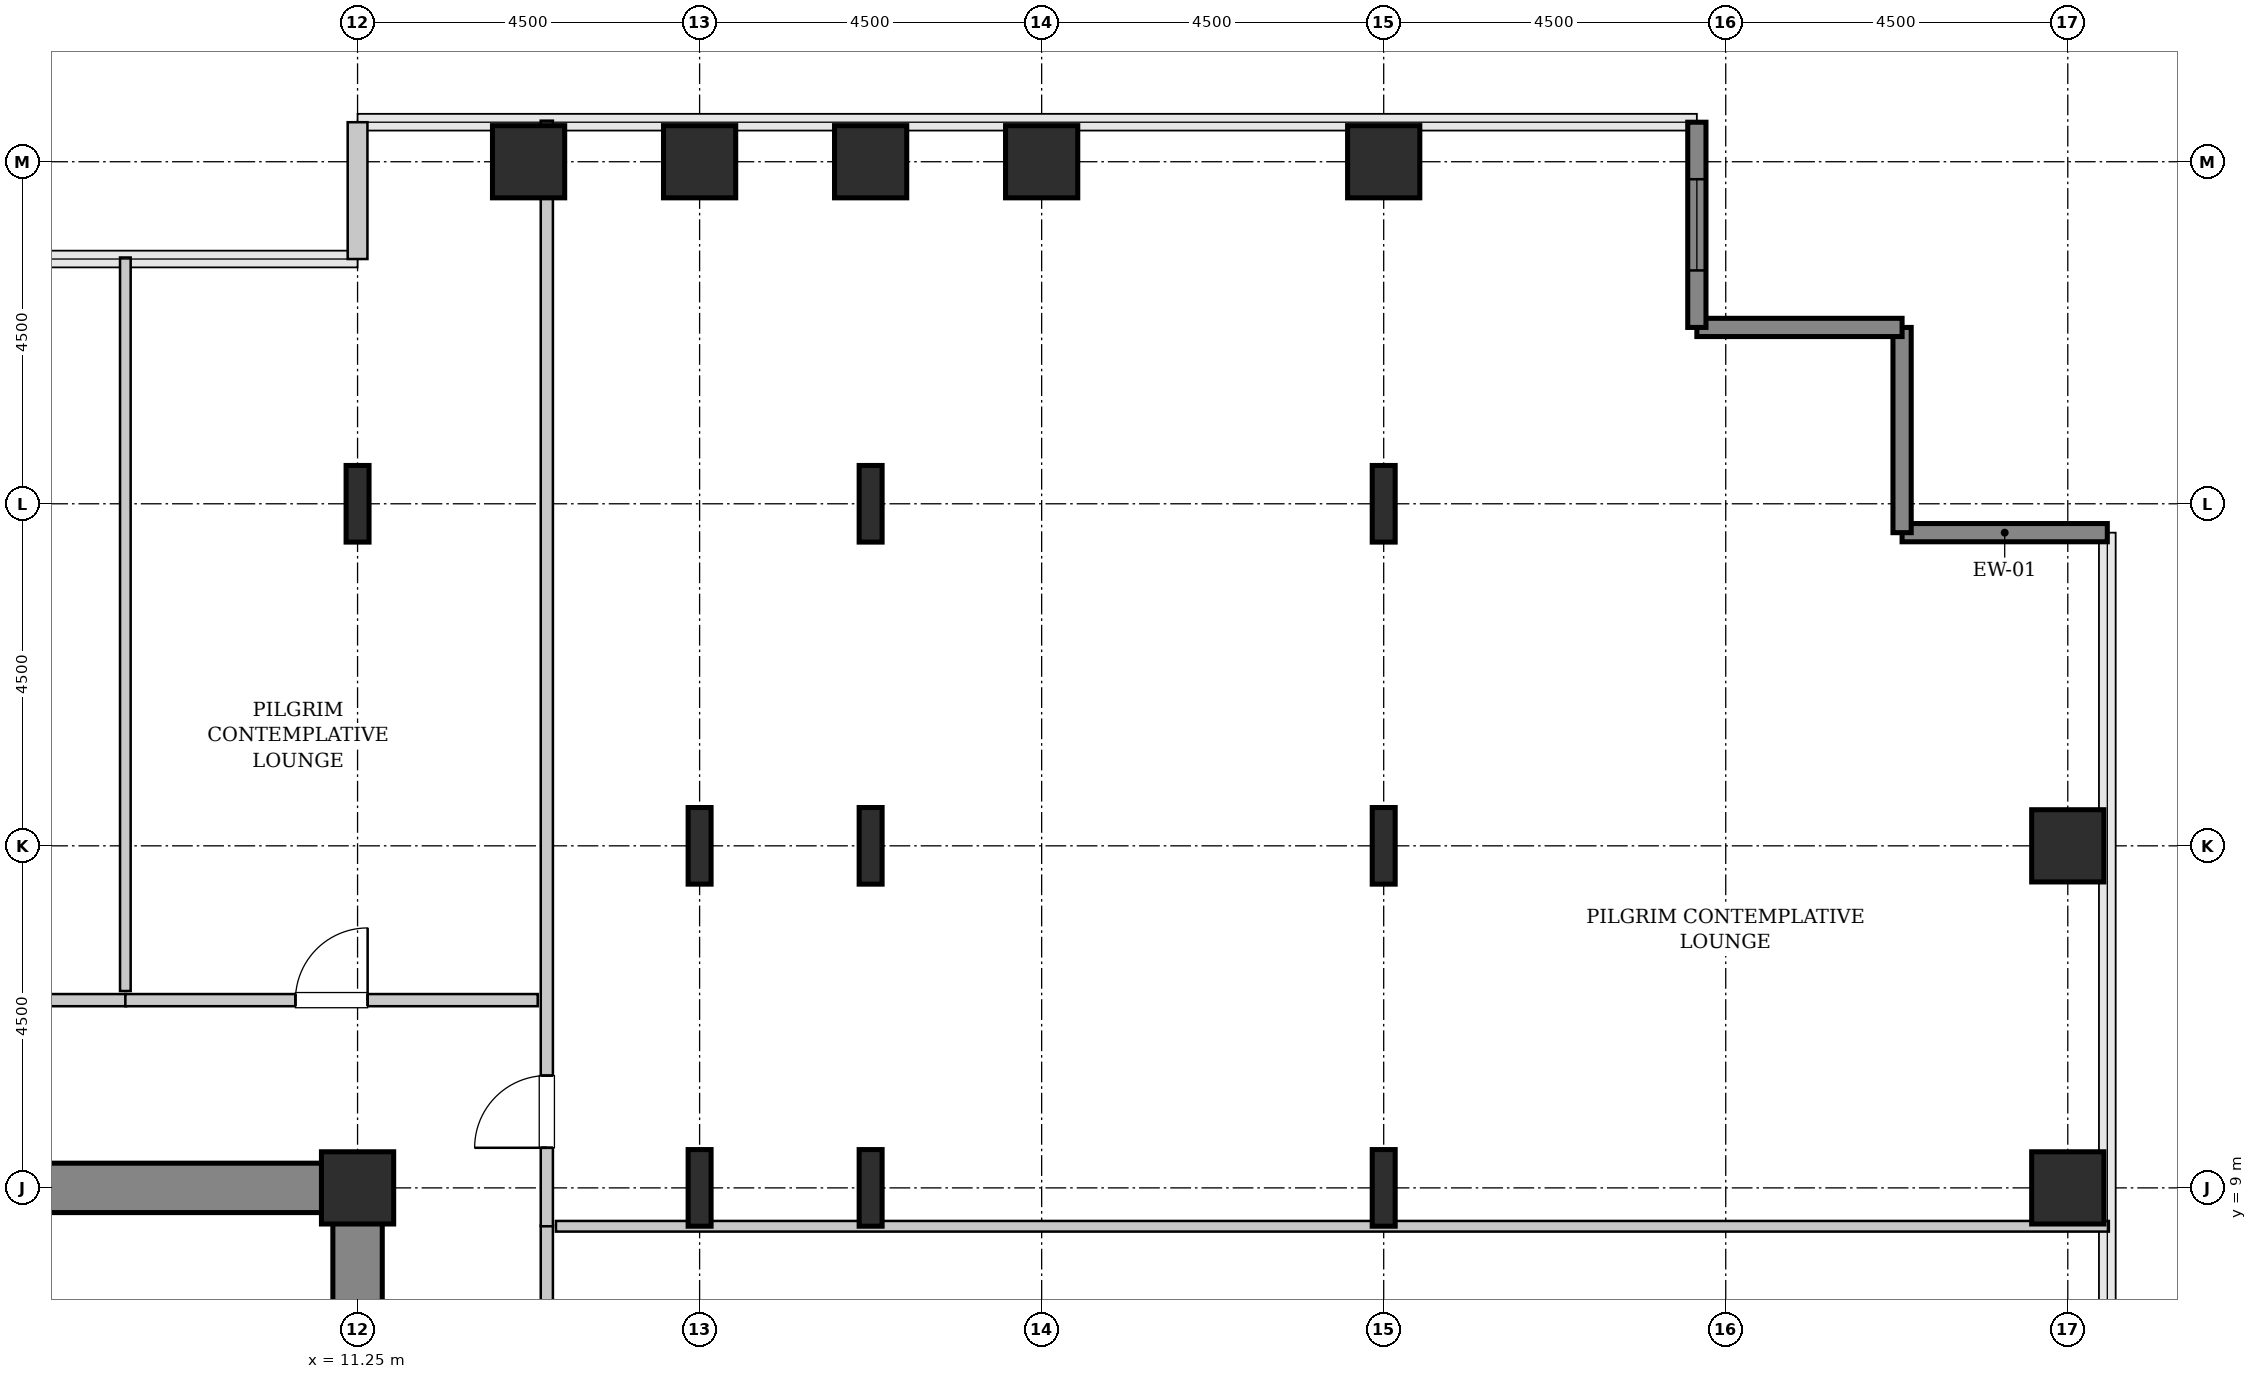
"""IFC4 building model, lengths in metres.
Left out: names, types, materials, properties, quantities, classifications, styles, units other than length and angle.
Written with IfcOpenShell. Run it as: python <this file> out.ifc"""

import sys

from ifc_helpers import new_model, si_unit, direction, frame, frame_2d, origin, origin_2d, place, context, subcontext, project, spatial, rectangle, hollow_rectangle, i_section, extrude, source, transform, mapped, element, fill, save


model = new_model("IFC4")
c1 = context("Model", 3, precision=1e-05, world=origin(), true_north=direction((0.0, 1.0)))
c2 = subcontext(c1, "Body", "Model", "MODEL_VIEW")
j1 = project(units=[si_unit("LENGTHUNIT", "METRE"), si_unit("PLANEANGLEUNIT", "RADIAN")], contexts=[c1])
p1 = place(None, origin())
s1 = spatial("IfcSite", under=j1, at=p1, CompositionType="ELEMENT")
p2 = place(p1, origin())
s2 = spatial("IfcBuilding", under=s1, at=p2, CompositionType="ELEMENT")
p3 = place(p2, frame((0.0, 0.0, 36.8)))
s3 = spatial("IfcBuildingStorey", under=s2, at=p3, CompositionType="ELEMENT", Elevation=36.8)
m1 = source(origin(), c2, "Body", "SweptSolid", [
    extrude(rectangle(XDim=10.025, YDim=0.65, at=frame_2d((5.012, 0.0))), origin(), (0.0, 0.0, 1.0), 3.8),
])
p4 = place(p3, frame((1.55, 9.0, 0.0), z_axis=(0.0, 0.0, 1.0), x_axis=(1.0, 0.0, 0.0)))
e1 = element("IfcWall", 1, at=p4, inside=s3, PredefinedType="SHEAR", context=c2, shape_type="MappedRepresentation", body=[
    mapped(m1, transform((0.0, 0.0, 0.0), x_axis=(1.0, 0.0, 0.0), y_axis=(0.0, 1.0, 0.0), z_axis=(0.0, 0.0, 1.0), scale=1.0)),
])
m2 = source(origin(), c2, "Body", "SweptSolid", [
    extrude(rectangle(XDim=7.325, YDim=0.65, at=frame_2d((3.663, 0.0))), origin(), (0.0, 0.0, 1.0), 3.8),
])
p5 = place(p3, frame((11.25, 1.35, 0.0), z_axis=(0.0, 0.0, 1.0), x_axis=(0.0, 1.0, 0.0)))
e2 = element("IfcWall", 2, at=p5, inside=s3, PredefinedType="SHEAR", context=c2, shape_type="MappedRepresentation", body=[
    mapped(m2, transform((0.0, 0.0, 0.0), x_axis=(1.0, 0.0, 0.0), y_axis=(0.0, 1.0, 0.0), z_axis=(0.0, 0.0, 1.0), scale=1.0)),
])
m3 = source(origin(), c2, "Body", "SweptSolid", [
    extrude(hollow_rectangle(XDim=0.95, YDim=0.95, WallThickness=0.045, InnerFilletRadius=0.045, OuterFilletRadius=0.09, at=origin_2d()), origin(), (0.0, 0.0, 1.0), 3.8),
])
p6 = place(p3, frame((11.25, 9.0, 0.0), z_axis=(0.0, 0.0, 1.0), x_axis=(1.0, 0.0, 0.0)))
e3 = element("IfcColumn", 3, at=p6, inside=s3, PredefinedType="COLUMN", context=c2, shape_type="MappedRepresentation", body=[
    mapped(m3, transform((0.0, 0.0, 0.0), x_axis=(1.0, 0.0, 0.0), y_axis=(0.0, 1.0, 0.0), z_axis=(0.0, 0.0, 1.0), scale=1.0)),
])
m4 = source(origin(), c2, "Body", "SweptSolid", [
    extrude(i_section(OverallWidth=0.302, OverallDepth=1.008, WebThickness=0.021, FlangeThickness=0.04, FilletRadius=0.03, at=origin_2d()), origin(), (0.0, 0.0, 1.0), 3.8),
])
p7 = place(p3, frame((11.25, 18.0, 0.0), z_axis=(0.0, 0.0, 1.0), x_axis=(1.0, 0.0, 0.0)))
e4 = element("IfcColumn", 4, at=p7, inside=s3, PredefinedType="COLUMN", context=c2, shape_type="MappedRepresentation", body=[
    mapped(m4, transform((0.0, 0.0, 0.0), x_axis=(1.0, 0.0, 0.0), y_axis=(0.0, 1.0, 0.0), z_axis=(0.0, 0.0, 1.0), scale=1.0)),
])
m5 = source(origin(), c2, "Body", "SweptSolid", [
    extrude(hollow_rectangle(XDim=0.95, YDim=0.95, WallThickness=0.045, InnerFilletRadius=0.045, OuterFilletRadius=0.09, at=origin_2d()), origin(), (0.0, 0.0, 1.0), 3.8),
])
p8 = place(p3, frame((13.5, 22.5, 0.0), z_axis=(0.0, 0.0, 1.0), x_axis=(1.0, 0.0, 0.0)))
e5 = element("IfcColumn", 5, at=p8, inside=s3, PredefinedType="COLUMN", context=c2, shape_type="MappedRepresentation", body=[
    mapped(m5, transform((0.0, 0.0, 0.0), x_axis=(1.0, 0.0, 0.0), y_axis=(0.0, 1.0, 0.0), z_axis=(0.0, 0.0, 1.0), scale=1.0)),
])
for number, where, z_axis, x_axis in (
    (6, (15.75, 9.0, 0.0), (0.0, 0.0, 1.0), (1.0, 0.0, 0.0)),
    (7, (15.75, 13.5, 0.0), (0.0, 0.0, 1.0), (1.0, 0.0, 0.0)),
):
    element("IfcColumn", number, at=place(p3, frame(where, z_axis=z_axis, x_axis=x_axis)), inside=s3, PredefinedType="COLUMN", context=c2, shape_type="MappedRepresentation", body=[
        mapped(m4, transform((0.0, 0.0, 0.0), x_axis=(1.0, 0.0, 0.0), y_axis=(0.0, 1.0, 0.0), z_axis=(0.0, 0.0, 1.0), scale=1.0)),
    ])
p9 = place(p3, frame((15.75, 22.5, 0.0), z_axis=(0.0, 0.0, 1.0), x_axis=(1.0, 0.0, 0.0)))
e8 = element("IfcColumn", 8, at=p9, inside=s3, PredefinedType="COLUMN", context=c2, shape_type="MappedRepresentation", body=[
    mapped(m5, transform((0.0, 0.0, 0.0), x_axis=(1.0, 0.0, 0.0), y_axis=(0.0, 1.0, 0.0), z_axis=(0.0, 0.0, 1.0), scale=1.0)),
])
for number, where, z_axis, x_axis in (
    (9, (18.0, 9.0, 0.0), (0.0, 0.0, 1.0), (1.0, 0.0, 0.0)),
    (10, (18.0, 13.5, 0.0), (0.0, 0.0, 1.0), (1.0, 0.0, 0.0)),
    (11, (18.0, 18.0, 0.0), (0.0, 0.0, 1.0), (1.0, 0.0, 0.0)),
):
    element("IfcColumn", number, at=place(p3, frame(where, z_axis=z_axis, x_axis=x_axis)), inside=s3, PredefinedType="COLUMN", context=c2, shape_type="MappedRepresentation", body=[
        mapped(m4, transform((0.0, 0.0, 0.0), x_axis=(1.0, 0.0, 0.0), y_axis=(0.0, 1.0, 0.0), z_axis=(0.0, 0.0, 1.0), scale=1.0)),
    ])
for number, where, z_axis, x_axis in (
    (12, (18.0, 22.5, 0.0), (0.0, 0.0, 1.0), (1.0, 0.0, 0.0)),
    (13, (20.25, 22.5, 0.0), (0.0, 0.0, 1.0), (1.0, 0.0, 0.0)),
):
    element("IfcColumn", number, at=place(p3, frame(where, z_axis=z_axis, x_axis=x_axis)), inside=s3, PredefinedType="COLUMN", context=c2, shape_type="MappedRepresentation", body=[
        mapped(m5, transform((0.0, 0.0, 0.0), x_axis=(1.0, 0.0, 0.0), y_axis=(0.0, 1.0, 0.0), z_axis=(0.0, 0.0, 1.0), scale=1.0)),
    ])
for number, where, z_axis, x_axis in (
    (14, (24.75, 9.0, 0.0), (0.0, 0.0, 1.0), (1.0, 0.0, 0.0)),
    (15, (24.75, 13.5, 0.0), (0.0, 0.0, 1.0), (1.0, 0.0, 0.0)),
    (16, (24.75, 18.0, 0.0), (0.0, 0.0, 1.0), (1.0, 0.0, 0.0)),
):
    element("IfcColumn", number, at=place(p3, frame(where, z_axis=z_axis, x_axis=x_axis)), inside=s3, PredefinedType="COLUMN", context=c2, shape_type="MappedRepresentation", body=[
        mapped(m4, transform((0.0, 0.0, 0.0), x_axis=(1.0, 0.0, 0.0), y_axis=(0.0, 1.0, 0.0), z_axis=(0.0, 0.0, 1.0), scale=1.0)),
    ])
for number, where, z_axis, x_axis in (
    (17, (24.75, 22.5, 0.0), (0.0, 0.0, 1.0), (1.0, 0.0, 0.0)),
    (18, (33.75, 9.0, 0.0), (0.0, 0.0, 1.0), (1.0, 0.0, 0.0)),
    (19, (33.75, 13.5, 0.0), (0.0, 0.0, 1.0), (1.0, 0.0, 0.0)),
):
    element("IfcColumn", number, at=place(p3, frame(where, z_axis=z_axis, x_axis=x_axis)), inside=s3, PredefinedType="COLUMN", context=c2, shape_type="MappedRepresentation", body=[
        mapped(m5, transform((0.0, 0.0, 0.0), x_axis=(1.0, 0.0, 0.0), y_axis=(0.0, 1.0, 0.0), z_axis=(0.0, 0.0, 1.0), scale=1.0)),
    ])
m6 = source(origin(), c2, "Body", "SweptSolid", [
    extrude(rectangle(XDim=2.7, YDim=0.24, at=frame_2d((1.35, 0.0))), origin(), (0.0, 0.0, 1.0), 3.55),
])
for number, where, z_axis, x_axis in (
    (20, (34.27, 17.62, 0.0), (0.0, 0.0, 1.0), (-1.0, 0.0, 0.0)),
    (21, (31.57, 17.62, 0.0), (0.0, 0.0, 1.0), (0.0, 1.0, 0.0)),
    (22, (31.57, 20.32, 0.0), (0.0, 0.0, 1.0), (-1.0, 0.0, 0.0)),
):
    element("IfcWall", number, at=place(p3, frame(where, z_axis=z_axis, x_axis=x_axis)), inside=s3, PredefinedType="SHEAR", context=c2, shape_type="MappedRepresentation", body=[
        mapped(m6, transform((0.0, 0.0, 0.0), x_axis=(1.0, 0.0, 0.0), y_axis=(0.0, 1.0, 0.0), z_axis=(0.0, 0.0, 1.0), scale=1.0)),
    ])
p10 = place(p3, frame((28.87, 20.32, 0.0), z_axis=(0.0, 0.0, 1.0), x_axis=(0.0, 1.0, 0.0)))
e23 = element("IfcWall", 23, at=p10, inside=s3, PredefinedType="SHEAR", context=c2, shape_type="MappedRepresentation", body=[
    mapped(m6, transform((0.0, 0.0, 0.0), x_axis=(1.0, 0.0, 0.0), y_axis=(0.0, 1.0, 0.0), z_axis=(0.0, 0.0, 1.0), scale=1.0)),
])
p11 = place(p10, frame((0.75, 0.0, 0.85)))
e24 = element("IfcOpeningElement", 24, at=p11, cuts=e23, PredefinedType="OPENING", context=c2, shape_type="SweptSolid", body=[
    extrude(rectangle(XDim=1.2, YDim=1.8, at=frame_2d((0.6, 0.9))), frame((0.0, 0.13, 0.0), z_axis=(0.0, -1.0, 0.0), x_axis=(1.0, 0.0, 0.0)), (0.0, 0.0, 1.0), 0.26),
])
m7 = source(origin(), c2, "Body", "SweptSolid", [
    extrude(rectangle(XDim=1.8, YDim=0.26, at=frame_2d((0.9, 0.0))), origin(), (0.0, 0.0, 1.0), 3.55),
])
p12 = place(p3, frame((11.25, 23.02, 0.0), z_axis=(0.0, 0.0, 1.0), x_axis=(0.0, -1.0, 0.0)))
e25 = element("IfcWall", 25, at=p12, inside=s3, PredefinedType="SOLIDWALL", context=c2, shape_type="MappedRepresentation", body=[
    mapped(m7, transform((0.0, 0.0, 0.0), x_axis=(1.0, 0.0, 0.0), y_axis=(0.0, 1.0, 0.0), z_axis=(0.0, 0.0, 1.0), scale=1.0)),
])
m8 = source(origin(), c2, "Body", "SweptSolid", [
    extrude(rectangle(XDim=3.4, YDim=0.16, at=frame_2d((1.7, 0.0))), origin(), (0.0, 0.0, 1.0), 3.535),
])
p13 = place(p3, frame((13.74, 5.105, 0.0), z_axis=(0.0, 0.0, 1.0), x_axis=(0.0, 1.0, 0.0)))
e26 = element("IfcWall", 26, at=p13, inside=s3, PredefinedType="PARTITIONING", context=c2, shape_type="MappedRepresentation", body=[
    mapped(m8, transform((0.0, 0.0, 0.0), x_axis=(1.0, 0.0, 0.0), y_axis=(0.0, 1.0, 0.0), z_axis=(0.0, 0.0, 1.0), scale=1.0)),
])
p14 = place(p13, frame((1.225, 0.0, 0.0)))
e27 = element("IfcOpeningElement", 27, at=p14, cuts=e26, PredefinedType="OPENING", context=c2, shape_type="SweptSolid", body=[
    extrude(rectangle(XDim=0.95, YDim=2.1, at=frame_2d((0.475, 1.05))), frame((0.0, 0.09, 0.0), z_axis=(0.0, -1.0, 0.0), x_axis=(1.0, 0.0, 0.0)), (0.0, 0.0, 1.0), 0.18),
])
m9 = source(origin(), c2, "Body", "SweptSolid", [
    extrude(rectangle(XDim=20.43, YDim=0.14, at=frame_2d((10.215, 0.0))), origin(), (0.0, 0.0, 1.0), 2.825),
])
p15 = place(p3, frame((13.86, 8.495, 0.0), z_axis=(0.0, 0.0, 1.0), x_axis=(1.0, 0.0, 0.0)))
e28 = element("IfcWall", 28, at=p15, inside=s3, PredefinedType="PARTITIONING", context=c2, shape_type="MappedRepresentation", body=[
    mapped(m9, transform((0.0, 0.0, 0.0), x_axis=(1.0, 0.0, 0.0), y_axis=(0.0, 1.0, 0.0), z_axis=(0.0, 0.0, 1.0), scale=1.0)),
])
m10 = source(origin(), c2, "Body", "SweptSolid", [
    extrude(rectangle(XDim=14.545, YDim=0.16, at=frame_2d((7.272, 0.0))), origin(), (0.0, 0.0, 1.0), 3.535),
])
p16 = place(p3, frame((13.74, 8.495, 0.0), z_axis=(0.0, 0.0, 1.0), x_axis=(0.0, 1.0, 0.0)))
e29 = element("IfcWall", 29, at=p16, inside=s3, PredefinedType="PARTITIONING", context=c2, shape_type="MappedRepresentation", body=[
    mapped(m10, transform((0.0, 0.0, 0.0), x_axis=(1.0, 0.0, 0.0), y_axis=(0.0, 1.0, 0.0), z_axis=(0.0, 0.0, 1.0), scale=1.0)),
])
p17 = place(p16, frame((1.032, 0.0, 0.0)))
e30 = element("IfcOpeningElement", 30, at=p17, cuts=e29, PredefinedType="OPENING", context=c2, shape_type="SweptSolid", body=[
    extrude(rectangle(XDim=0.95, YDim=2.1, at=frame_2d((0.475, 1.05))), frame((0.0, 0.09, 0.0), z_axis=(0.0, -1.0, 0.0), x_axis=(1.0, 0.0, 0.0)), (0.0, 0.0, 1.0), 0.18),
])
m11 = source(origin(), c2, "Body", "SweptSolid", [
    extrude(rectangle(XDim=5.81, YDim=0.16, at=frame_2d((2.905, 0.0))), origin(), (0.0, 0.0, 1.0), 3.535),
])
p18 = place(p3, frame((2.395, 11.47, 0.0), z_axis=(0.0, 0.0, 1.0), x_axis=(1.0, 0.0, 0.0)))
e31 = element("IfcWall", 31, at=p18, inside=s3, PredefinedType="PARTITIONING", context=c2, shape_type="MappedRepresentation", body=[
    mapped(m11, transform((0.0, 0.0, 0.0), x_axis=(1.0, 0.0, 0.0), y_axis=(0.0, 1.0, 0.0), z_axis=(0.0, 0.0, 1.0), scale=1.0)),
])
p19 = place(p18, frame((2.43, 0.0, 0.0)))
e32 = element("IfcOpeningElement", 32, at=p19, cuts=e31, PredefinedType="OPENING", context=c2, shape_type="SweptSolid", body=[
    extrude(rectangle(XDim=0.95, YDim=2.1, at=frame_2d((0.475, 1.05))), frame((0.0, 0.09, 0.0), z_axis=(0.0, -1.0, 0.0), x_axis=(1.0, 0.0, 0.0)), (0.0, 0.0, 1.0), 0.18),
])
m12 = source(origin(), c2, "Body", "SweptSolid", [
    extrude(rectangle(XDim=9.65, YDim=0.14, at=frame_2d((4.825, 0.0))), origin(), (0.0, 0.0, 1.0), 3.535),
])
p20 = place(p3, frame((8.195, 11.59, 0.0), z_axis=(0.0, 0.0, 1.0), x_axis=(0.0, 1.0, 0.0)))
e33 = element("IfcWall", 33, at=p20, inside=s3, PredefinedType="PARTITIONING", context=c2, shape_type="MappedRepresentation", body=[
    mapped(m12, transform((0.0, 0.0, 0.0), x_axis=(1.0, 0.0, 0.0), y_axis=(0.0, 1.0, 0.0), z_axis=(0.0, 0.0, 1.0), scale=1.0)),
])
m13 = source(origin(), c2, "Body", "SweptSolid", [
    extrude(rectangle(XDim=5.425, YDim=0.16, at=frame_2d((2.712, 0.0))), origin(), (0.0, 0.0, 1.0), 3.535),
])
p21 = place(p3, frame((8.195, 11.47, 0.0), z_axis=(0.0, 0.0, 1.0), x_axis=(1.0, 0.0, 0.0)))
e34 = element("IfcWall", 34, at=p21, inside=s3, PredefinedType="PARTITIONING", context=c2, shape_type="MappedRepresentation", body=[
    mapped(m13, transform((0.0, 0.0, 0.0), x_axis=(1.0, 0.0, 0.0), y_axis=(0.0, 1.0, 0.0), z_axis=(0.0, 0.0, 1.0), scale=1.0)),
])
p22 = place(p21, frame((2.238, 0.0, 0.0)))
e35 = element("IfcOpeningElement", 35, at=p22, cuts=e34, PredefinedType="OPENING", context=c2, shape_type="SweptSolid", body=[
    extrude(rectangle(XDim=0.95, YDim=2.1, at=frame_2d((0.475, 1.05))), frame((0.0, 0.09, 0.0), z_axis=(0.0, -1.0, 0.0), x_axis=(1.0, 0.0, 0.0)), (0.0, 0.0, 1.0), 0.18),
])
m14 = source(origin(), c2, "Body", "SweptSolid", [
    extrude(rectangle(XDim=1.2, YDim=1.8, at=frame_2d((0.6, 0.9))), frame((0.0, 0.03, 0.0), z_axis=(0.0, -1.0, 0.0), x_axis=(1.0, 0.0, 0.0)), (0.0, 0.0, 1.0), 0.06),
])
p23 = place(p11, origin())
e36 = element("IfcWindow", 36, at=p23, inside=s3, PartitioningType="SINGLE_PANEL", PredefinedType="WINDOW", context=c2, shape_type="MappedRepresentation", body=[
    mapped(m14, transform((0.0, 0.0, 0.0), x_axis=(1.0, 0.0, 0.0), y_axis=(0.0, 1.0, 0.0), z_axis=(0.0, 0.0, 1.0), scale=1.0)),
])
fill(e24, e36)
m15 = source(origin(), c2, "Body", "SweptSolid", [
    extrude(rectangle(XDim=0.95, YDim=2.1, at=frame_2d((0.475, 1.05))), frame((0.0, 0.025, 0.0), z_axis=(0.0, -1.0, 0.0), x_axis=(1.0, 0.0, 0.0)), (0.0, 0.0, 1.0), 0.05),
])
p24 = place(p17, origin())
e37 = element("IfcDoor", 37, at=p24, inside=s3, OperationType="SINGLE_SWING_LEFT", PredefinedType="DOOR", context=c2, shape_type="MappedRepresentation", body=[
    mapped(m15, transform((0.0, 0.0, 0.0), x_axis=(1.0, 0.0, 0.0), y_axis=(0.0, 1.0, 0.0), z_axis=(0.0, 0.0, 1.0), scale=1.0)),
])
fill(e30, e37)
p25 = place(p22, origin())
e38 = element("IfcDoor", 38, at=p25, inside=s3, OperationType="SINGLE_SWING_RIGHT", PredefinedType="DOOR", context=c2, shape_type="MappedRepresentation", body=[
    mapped(m15, transform((0.0, 0.0, 0.0), x_axis=(1.0, 0.0, 0.0), y_axis=(0.0, 1.0, 0.0), z_axis=(0.0, 0.0, 1.0), scale=1.0)),
])
fill(e35, e38)
save(model, sys.argv[1])
